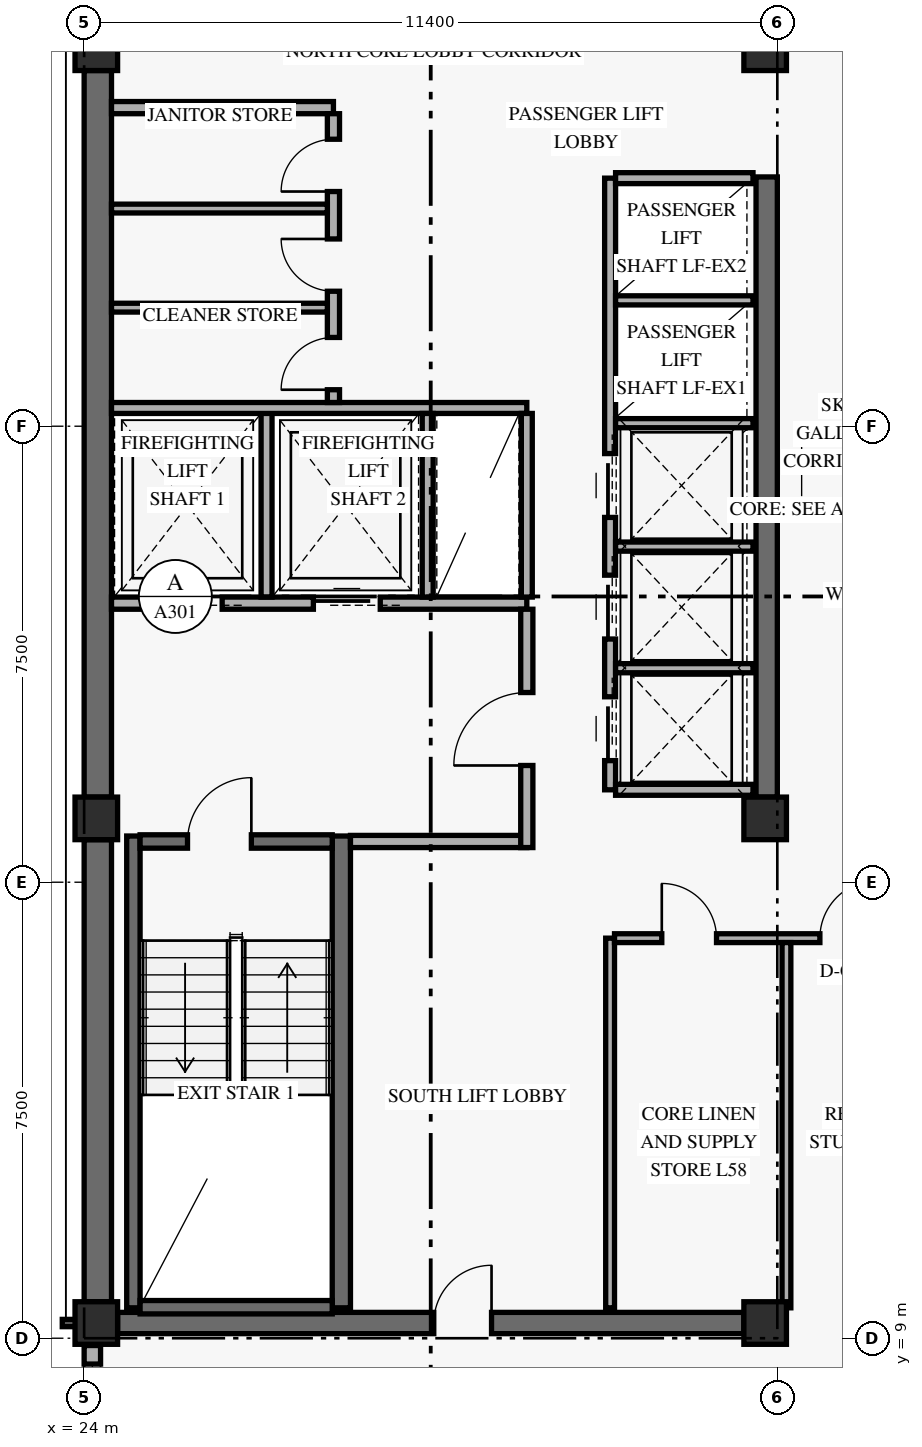
"""IFC4 building model, lengths in metres.
Left out: names, types, materials, properties, quantities, classifications, styles, units other than length and angle.
Written with IfcOpenShell. Run it as: python <this file> out.ifc"""

import sys

from ifc_helpers import new_model, si_unit, direction, frame, frame_2d, origin, origin_2d, place, context, subcontext, project, spatial, rectangle, extrude, element, fill, save


model = new_model("IFC4")
c1 = context("Model", 3, precision=1e-05, world=origin(), true_north=direction((0.0, 1.0)))
c2 = subcontext(c1, "Body", "Model", "MODEL_VIEW")
j1 = project(units=[si_unit("LENGTHUNIT", "METRE"), si_unit("PLANEANGLEUNIT", "RADIAN")], contexts=[c1])
p1 = place(None, origin())
s1 = spatial("IfcSite", under=j1, at=p1, CompositionType="ELEMENT")
p2 = place(p1, origin())
s2 = spatial("IfcBuilding", under=s1, at=p2, CompositionType="ELEMENT")
p3 = place(p2, frame((0.0, 0.0, 223.8)))
s3 = spatial("IfcBuildingStorey", under=s2, at=p3, CompositionType="ELEMENT", Elevation=223.8)
p4 = place(p3, frame((24.225, 9.6, 0.0), z_axis=(0.0, 0.0, 1.0), x_axis=(0.0, 1.0, 0.0)))
e1 = element("IfcWall", 1, at=p4, inside=s3, PredefinedType="SHEAR", context=c2, shape_type="SweptSolid", body=[
    extrude(rectangle(XDim=7.6, YDim=0.45, at=frame_2d((3.8, 0.0))), origin(), (0.0, 0.0, 1.0), 2.821),
])
p5 = place(p3, frame((24.225, 17.9, 0.0), z_axis=(0.0, 0.0, 1.0), x_axis=(0.0, 1.0, 0.0)))
e2 = element("IfcWall", 2, at=p5, inside=s3, PredefinedType="SHEAR", context=c2, shape_type="SweptSolid", body=[
    extrude(rectangle(XDim=11.95, YDim=0.45, at=frame_2d((5.975, 0.0))), origin(), (0.0, 0.0, 1.0), 2.821),
])
p6 = place(p3, frame((35.225, 17.9, 0.0), z_axis=(0.0, 0.0, 1.0), x_axis=(0.0, 1.0, 0.0)))
e3 = element("IfcWall", 3, at=p6, inside=s3, PredefinedType="SHEAR", context=c2, shape_type="SweptSolid", body=[
    extrude(rectangle(XDim=10.2, YDim=0.35, at=frame_2d((5.1, 0.0))), origin(), (0.0, 0.0, 1.0), 2.821),
])
p7 = place(p3, frame((24.55, 9.25, 0.0), z_axis=(0.0, 0.0, 1.0), x_axis=(1.0, 0.0, 0.0)))
e4 = element("IfcWall", 4, at=p7, inside=s3, PredefinedType="SHEAR", context=c2, shape_type="SweptSolid", body=[
    extrude(rectangle(XDim=10.3, YDim=0.35, at=frame_2d((5.15, 0.0))), origin(), (0.0, 0.0, 1.0), 3.36),
])
p8 = place(p7, frame((5.2, 0.0, 0.0)))
e5 = element("IfcOpeningElement", 5, at=p8, cuts=e4, PredefinedType="OPENING", context=c2, shape_type="SweptSolid", body=[
    extrude(rectangle(XDim=0.95, YDim=2.15, at=frame_2d((0.475, 1.075))), frame((0.0, 0.185, 0.0), z_axis=(0.0, -1.0, 0.0), x_axis=(1.0, 0.0, 0.0)), (0.0, 0.0, 1.0), 0.37),
])
p9 = place(p3, frame((24.81, 9.5, 0.0), z_axis=(0.0, 0.0, 1.0), x_axis=(0.0, 1.0, 0.0)))
e6 = element("IfcWall", 6, at=p9, inside=s3, PredefinedType="SHEAR", context=c2, shape_type="SweptSolid", body=[
    extrude(rectangle(XDim=7.76, YDim=0.22, at=frame_2d((3.88, 0.0))), origin(), (0.0, 0.0, 1.0), 3.36),
])
p10 = place(p3, frame((28.23, 9.5, 0.0), z_axis=(0.0, 0.0, 1.0), x_axis=(0.0, 1.0, 0.0)))
e7 = element("IfcWall", 7, at=p10, inside=s3, PredefinedType="SHEAR", context=c2, shape_type="SweptSolid", body=[
    extrude(rectangle(XDim=7.76, YDim=0.3, at=frame_2d((3.88, 0.0))), origin(), (0.0, 0.0, 1.0), 3.36),
])
p11 = place(p3, frame((24.92, 9.51, 0.0), z_axis=(0.0, 0.0, 1.0), x_axis=(1.0, 0.0, 0.0)))
e8 = element("IfcWall", 8, at=p11, inside=s3, PredefinedType="SHEAR", context=c2, shape_type="SweptSolid", body=[
    extrude(rectangle(XDim=3.16, YDim=0.22, at=frame_2d((1.58, 0.0))), origin(), (0.0, 0.0, 1.0), 3.36),
])
p12 = place(p3, frame((24.92, 17.17, 0.0), z_axis=(0.0, 0.0, 1.0), x_axis=(1.0, 0.0, 0.0)))
e9 = element("IfcWall", 9, at=p12, inside=s3, PredefinedType="SHEAR", context=c2, shape_type="SweptSolid", body=[
    extrude(rectangle(XDim=3.16, YDim=0.22, at=frame_2d((1.58, 0.0))), origin(), (0.0, 0.0, 1.0), 3.36),
])
p13 = place(p12, frame((0.78, 0.0, 0.0)))
e10 = element("IfcOpeningElement", 10, at=p13, cuts=e9, PredefinedType="OPENING", context=c2, shape_type="SweptSolid", body=[
    extrude(rectangle(XDim=1.05, YDim=2.15, at=frame_2d((0.525, 1.075))), frame((0.0, 0.12, 0.0), z_axis=(0.0, -1.0, 0.0), x_axis=(1.0, 0.0, 0.0)), (0.0, 0.0, 1.0), 0.24),
])
for number, where, z_axis, x_axis in (
    (11, (24.2, 9.25, 0.0), (0.0, 0.0, 1.0), (1.0, 0.0, 0.0)),
    (12, (24.2, 17.55, 0.0), (0.0, 0.0, 1.0), (1.0, 0.0, 0.0)),
    (13, (24.2, 30.2, 0.0), (0.0, 0.0, 1.0), (1.0, 0.0, 0.0)),
    (14, (35.2, 9.25, 0.0), (0.0, 0.0, 1.0), (1.0, 0.0, 0.0)),
    (15, (35.2, 17.55, 0.0), (0.0, 0.0, 1.0), (1.0, 0.0, 0.0)),
    (16, (35.2, 30.2, 0.0), (0.0, 0.0, 1.0), (1.0, 0.0, 0.0)),
):
    element("IfcColumn", number, at=place(p3, frame(where, z_axis=z_axis, x_axis=x_axis)), inside=s3, PredefinedType="COLUMN", context=c2, shape_type="SweptSolid", body=[
        extrude(rectangle(XDim=0.7, YDim=0.7, at=origin_2d()), origin(), (0.0, 0.0, 1.0), 3.6),
    ])
p14 = place(p3, frame((24.135, 7.32, 0.0), z_axis=(0.0, 0.0, 1.0), x_axis=(0.0, 1.0, 0.0)))
e17 = element("IfcWall", 17, at=p14, inside=s3, PredefinedType="SOLIDWALL", context=c2, shape_type="SweptSolid", body=[
    extrude(rectangle(XDim=1.56, YDim=0.27, at=frame_2d((0.78, 0.0))), origin(), (0.0, 0.0, 1.0), 2.803),
])
p15 = place(p14, frame((0.305, 0.0, 0.85)))
e18 = element("IfcOpeningElement", 18, at=p15, cuts=e17, PredefinedType="OPENING", context=c2, shape_type="SweptSolid", body=[
    extrude(rectangle(XDim=0.95, YDim=1.5, at=frame_2d((0.475, 0.75))), frame((0.0, 0.145, 0.0), z_axis=(0.0, -1.0, 0.0), x_axis=(1.0, 0.0, 0.0)), (0.0, 0.0, 1.0), 0.29),
])
p16 = place(p3, frame((24.45, 21.09, 0.0), z_axis=(0.0, 0.0, 1.0), x_axis=(1.0, 0.0, 0.0)))
e19 = element("IfcWall", 19, at=p16, inside=s3, PredefinedType="STANDARD", context=c2, shape_type="SweptSolid", body=[
    extrude(rectangle(XDim=6.83, YDim=0.2, at=frame_2d((3.415, 0.0))), origin(), (0.0, 0.0, 1.0), 3.36),
])
p17 = place(p16, frame((0.72, 0.0, 0.0)))
e20 = element("IfcOpeningElement", 20, at=p17, cuts=e19, PredefinedType="OPENING", context=c2, shape_type="SweptSolid", body=[
    extrude(rectangle(XDim=1.1, YDim=2.2, at=frame_2d((0.55, 1.1))), frame((0.0, 0.11, 0.0), z_axis=(0.0, -1.0, 0.0), x_axis=(1.0, 0.0, 0.0)), (0.0, 0.0, 1.0), 0.22),
])
p18 = place(p16, frame((3.32, 0.0, 0.0)))
e21 = element("IfcOpeningElement", 21, at=p18, cuts=e19, PredefinedType="OPENING", context=c2, shape_type="SweptSolid", body=[
    extrude(rectangle(XDim=1.1, YDim=2.2, at=frame_2d((0.55, 1.1))), frame((0.0, 0.11, 0.0), z_axis=(0.0, -1.0, 0.0), x_axis=(1.0, 0.0, 0.0)), (0.0, 0.0, 1.0), 0.22),
])
p19 = place(p3, frame((28.38, 17.17, 0.0), z_axis=(0.0, 0.0, 1.0), x_axis=(1.0, 0.0, 0.0)))
e22 = element("IfcWall", 22, at=p19, inside=s3, PredefinedType="STANDARD", context=c2, shape_type="SweptSolid", body=[
    extrude(rectangle(XDim=2.9, YDim=0.2, at=frame_2d((1.45, 0.0))), origin(), (0.0, 0.0, 1.0), 3.36),
])
p20 = place(p3, frame((31.28, 17.07, 0.0), z_axis=(0.0, 0.0, 1.0), x_axis=(0.0, 1.0, 0.0)))
e23 = element("IfcWall", 23, at=p20, inside=s3, PredefinedType="STANDARD", context=c2, shape_type="SweptSolid", body=[
    extrude(rectangle(XDim=3.92, YDim=0.2, at=frame_2d((1.96, 0.0))), origin(), (0.0, 0.0, 1.0), 2.803),
])
p21 = place(p20, frame((1.35, 0.0, 0.0)))
e24 = element("IfcOpeningElement", 24, at=p21, cuts=e23, PredefinedType="OPENING", context=c2, shape_type="SweptSolid", body=[
    extrude(rectangle(XDim=1.2, YDim=2.15, at=frame_2d((0.6, 1.075))), frame((0.0, 0.11, 0.0), z_axis=(0.0, -1.0, 0.0), x_axis=(1.0, 0.0, 0.0)), (0.0, 0.0, 1.0), 0.22),
])
p22 = place(p3, frame((27.0, 21.19, 0.0), z_axis=(0.0, 0.0, 1.0), x_axis=(0.0, 1.0, 0.0)))
e25 = element("IfcWall", 25, at=p22, inside=s3, PredefinedType="STANDARD", context=c2, shape_type="SweptSolid", body=[
    extrude(rectangle(XDim=3.11, YDim=0.18, at=frame_2d((1.555, 0.0))), origin(), (0.0, 0.0, 1.0), 3.36),
])
p23 = place(p3, frame((24.45, 24.3, 0.0), z_axis=(0.0, 0.0, 1.0), x_axis=(1.0, 0.0, 0.0)))
e26 = element("IfcWall", 26, at=p23, inside=s3, PredefinedType="STANDARD", context=c2, shape_type="SweptSolid", body=[
    extrude(rectangle(XDim=6.83, YDim=0.18, at=frame_2d((3.415, 0.0))), origin(), (0.0, 0.0, 1.0), 3.36),
])
for number, where, z_axis, x_axis in (
    (27, (29.65, 21.19, 0.0), (0.0, 0.0, 1.0), (0.0, 1.0, 0.0)),
    (28, (31.28, 21.19, 0.0), (0.0, 0.0, 1.0), (0.0, 1.0, 0.0)),
):
    element("IfcWall", number, at=place(p3, frame(where, z_axis=z_axis, x_axis=x_axis)), inside=s3, PredefinedType="STANDARD", context=c2, shape_type="SweptSolid", body=[
        extrude(rectangle(XDim=3.02, YDim=0.18, at=frame_2d((1.51, 0.0))), origin(), (0.0, 0.0, 1.0), 3.36),
    ])
p24 = place(p3, frame((24.45, 29.24, 0.0), z_axis=(0.0, 0.0, 1.0), x_axis=(1.0, 0.0, 0.0)))
e29 = element("IfcWall", 29, at=p24, inside=s3, PredefinedType="STANDARD", context=c2, shape_type="SweptSolid", body=[
    extrude(rectangle(XDim=3.65, YDim=0.2, at=frame_2d((1.825, 0.0))), origin(), (0.0, 0.0, 1.0), 3.36),
])
p25 = place(p3, frame((28.1, 24.39, 0.0), z_axis=(0.0, 0.0, 1.0), x_axis=(0.0, 1.0, 0.0)))
e30 = element("IfcWall", 30, at=p25, inside=s3, PredefinedType="STANDARD", context=c2, shape_type="SweptSolid", body=[
    extrude(rectangle(XDim=4.75, YDim=0.2, at=frame_2d((2.375, 0.0))), origin(), (0.0, 0.0, 1.0), 3.36),
])
p26 = place(p25, frame((0.21, 0.0, 0.0)))
e31 = element("IfcOpeningElement", 31, at=p26, cuts=e30, PredefinedType="OPENING", context=c2, shape_type="SweptSolid", body=[
    extrude(rectangle(XDim=0.86, YDim=2.1, at=frame_2d((0.43, 1.05))), frame((0.0, 0.11, 0.0), z_axis=(0.0, -1.0, 0.0), x_axis=(1.0, 0.0, 0.0)), (0.0, 0.0, 1.0), 0.22),
])
p27 = place(p25, frame((1.83, 0.0, 0.0)))
e32 = element("IfcOpeningElement", 32, at=p27, cuts=e30, PredefinedType="OPENING", context=c2, shape_type="SweptSolid", body=[
    extrude(rectangle(XDim=0.86, YDim=2.1, at=frame_2d((0.43, 1.05))), frame((0.0, 0.11, 0.0), z_axis=(0.0, -1.0, 0.0), x_axis=(1.0, 0.0, 0.0)), (0.0, 0.0, 1.0), 0.22),
])
p28 = place(p25, frame((3.47, 0.0, 0.0)))
e33 = element("IfcOpeningElement", 33, at=p28, cuts=e30, PredefinedType="OPENING", context=c2, shape_type="SweptSolid", body=[
    extrude(rectangle(XDim=0.86, YDim=2.1, at=frame_2d((0.43, 1.05))), frame((0.0, 0.11, 0.0), z_axis=(0.0, -1.0, 0.0), x_axis=(1.0, 0.0, 0.0)), (0.0, 0.0, 1.0), 0.22),
])
for number, where, z_axis, x_axis in (
    (34, (24.45, 25.95, 0.0), (0.0, 0.0, 1.0), (1.0, 0.0, 0.0)),
    (35, (24.45, 27.58, 0.0), (0.0, 0.0, 1.0), (1.0, 0.0, 0.0)),
):
    element("IfcWall", number, at=place(p3, frame(where, z_axis=z_axis, x_axis=x_axis)), inside=s3, PredefinedType="PARTITIONING", context=c2, shape_type="SweptSolid", body=[
        extrude(rectangle(XDim=3.55, YDim=0.145, at=frame_2d((1.775, 0.0))), origin(), (0.0, 0.0, 1.0), 3.36),
    ])
p29 = place(p3, frame((32.65, 18.02, 0.0), z_axis=(0.0, 0.0, 1.0), x_axis=(0.0, 1.0, 0.0)))
e36 = element("IfcWall", 36, at=p29, inside=s3, PredefinedType="STANDARD", context=c2, shape_type="SweptSolid", body=[
    extrude(rectangle(XDim=10.06, YDim=0.18, at=frame_2d((5.03, 0.0))), origin(), (0.0, 0.0, 1.0), 3.36),
])
p30 = place(p29, frame((0.48, 0.0, 0.0)))
e37 = element("IfcOpeningElement", 37, at=p30, cuts=e36, PredefinedType="OPENING", context=c2, shape_type="SweptSolid", body=[
    extrude(rectangle(XDim=1.05, YDim=2.2, at=frame_2d((0.525, 1.1))), frame((0.0, 0.1, 0.0), z_axis=(0.0, -1.0, 0.0), x_axis=(1.0, 0.0, 0.0)), (0.0, 0.0, 1.0), 0.2),
])
p31 = place(p29, frame((2.48, 0.0, 0.0)))
e38 = element("IfcOpeningElement", 38, at=p31, cuts=e36, PredefinedType="OPENING", context=c2, shape_type="SweptSolid", body=[
    extrude(rectangle(XDim=1.05, YDim=2.2, at=frame_2d((0.525, 1.1))), frame((0.0, 0.1, 0.0), z_axis=(0.0, -1.0, 0.0), x_axis=(1.0, 0.0, 0.0)), (0.0, 0.0, 1.0), 0.2),
])
p32 = place(p29, frame((4.48, 0.0, 0.0)))
e39 = element("IfcOpeningElement", 39, at=p32, cuts=e36, PredefinedType="OPENING", context=c2, shape_type="SweptSolid", body=[
    extrude(rectangle(XDim=1.05, YDim=2.2, at=frame_2d((0.525, 1.1))), frame((0.0, 0.1, 0.0), z_axis=(0.0, -1.0, 0.0), x_axis=(1.0, 0.0, 0.0)), (0.0, 0.0, 1.0), 0.2),
])
for number, where, z_axis, x_axis in (
    (40, (32.74, 18.02, 0.0), (0.0, 0.0, 1.0), (1.0, 0.0, 0.0)),
    (41, (32.74, 28.08, 0.0), (0.0, 0.0, 1.0), (1.0, 0.0, 0.0)),
):
    element("IfcWall", number, at=place(p3, frame(where, z_axis=z_axis, x_axis=x_axis)), inside=s3, PredefinedType="STANDARD", context=c2, shape_type="SweptSolid", body=[
        extrude(rectangle(XDim=2.26, YDim=0.18, at=frame_2d((1.13, 0.0))), origin(), (0.0, 0.0, 1.0), 3.36),
    ])
for number, where, z_axis, x_axis in (
    (42, (32.74, 20.02, 0.0), (0.0, 0.0, 1.0), (1.0, 0.0, 0.0)),
    (43, (32.74, 22.02, 0.0), (0.0, 0.0, 1.0), (1.0, 0.0, 0.0)),
    (44, (32.74, 24.05, 0.0), (0.0, 0.0, 1.0), (1.0, 0.0, 0.0)),
    (45, (32.74, 26.07, 0.0), (0.0, 0.0, 1.0), (1.0, 0.0, 0.0)),
):
    element("IfcWall", number, at=place(p3, frame(where, z_axis=z_axis, x_axis=x_axis)), inside=s3, PredefinedType="STANDARD", context=c2, shape_type="SweptSolid", body=[
        extrude(rectangle(XDim=2.26, YDim=0.15, at=frame_2d((1.13, 0.0))), origin(), (0.0, 0.0, 1.0), 3.36),
    ])
p33 = place(p3, frame((32.65, 9.5, 0.0), z_axis=(0.0, 0.0, 1.0), x_axis=(0.0, 1.0, 0.0)))
e46 = element("IfcWall", 46, at=p33, inside=s3, PredefinedType="PARTITIONING", context=c2, shape_type="SweptSolid", body=[
    extrude(rectangle(XDim=6.08, YDim=0.145, at=frame_2d((3.04, 0.0))), origin(), (0.0, 0.0, 1.0), 3.36),
])
p34 = place(p3, frame((32.722, 15.58, 0.0), z_axis=(0.0, 0.0, 1.0), x_axis=(1.0, 0.0, 0.0)))
e47 = element("IfcWall", 47, at=p34, inside=s3, PredefinedType="PARTITIONING", context=c2, shape_type="SweptSolid", body=[
    extrude(rectangle(XDim=5.628, YDim=0.145, at=frame_2d((2.814, 0.0))), origin(), (0.0, 0.0, 1.0), 2.803),
])
p35 = place(p34, frame((0.778, 0.0, 0.0)))
e48 = element("IfcOpeningElement", 48, at=p35, cuts=e47, PredefinedType="OPENING", context=c2, shape_type="SweptSolid", body=[
    extrude(rectangle(XDim=0.9, YDim=2.1, at=frame_2d((0.45, 1.05))), frame((0.0, 0.083, 0.0), z_axis=(0.0, -1.0, 0.0), x_axis=(1.0, 0.0, 0.0)), (0.0, 0.0, 1.0), 0.165),
])
p36 = place(p34, frame((3.377, 0.0, 0.0)))
e49 = element("IfcOpeningElement", 49, at=p36, cuts=e47, PredefinedType="OPENING", context=c2, shape_type="SweptSolid", body=[
    extrude(rectangle(XDim=0.95, YDim=2.15, at=frame_2d((0.475, 1.075))), frame((0.0, 0.083, 0.0), z_axis=(0.0, -1.0, 0.0), x_axis=(1.0, 0.0, 0.0)), (0.0, 0.0, 1.0), 0.165),
])
p37 = place(p3, frame((35.55, 9.5, 0.0), z_axis=(0.0, 0.0, 1.0), x_axis=(0.0, 1.0, 0.0)))
e50 = element("IfcWall", 50, at=p37, inside=s3, PredefinedType="PARTITIONING", context=c2, shape_type="SweptSolid", body=[
    extrude(rectangle(XDim=6.008, YDim=0.145, at=frame_2d((3.004, 0.0))), origin(), (0.0, 0.0, 1.0), 3.039),
])
p38 = place(p15, origin())
e51 = element("IfcWindow", 51, at=p38, inside=s3, PartitioningType="SINGLE_PANEL", PredefinedType="WINDOW", context=c2, shape_type="SweptSolid", body=[
    extrude(rectangle(XDim=0.95, YDim=1.5, at=frame_2d((0.475, 0.75))), frame((0.0, 0.03, 0.0), z_axis=(0.0, -1.0, 0.0), x_axis=(1.0, 0.0, 0.0)), (0.0, 0.0, 1.0), 0.06),
])
fill(e18, e51)
p39 = place(p13, frame((1.05, 0.0, 0.0), z_axis=(0.0, 0.0, 1.0), x_axis=(-1.0, 0.0, 0.0)))
e52 = element("IfcDoor", 52, at=p39, inside=s3, OperationType="SINGLE_SWING_LEFT", PredefinedType="DOOR", context=c2, shape_type="SweptSolid", body=[
    extrude(rectangle(XDim=1.05, YDim=2.15, at=frame_2d((0.525, 1.075))), frame((0.0, 0.025, 0.0), z_axis=(0.0, -1.0, 0.0), x_axis=(1.0, 0.0, 0.0)), (0.0, 0.0, 1.0), 0.05),
])
fill(e10, e52)
p40 = place(p17, origin())
e53 = element("IfcDoor", 53, at=p40, inside=s3, OperationType="SLIDING_TO_LEFT", PredefinedType="DOOR", context=c2, shape_type="SweptSolid", body=[
    extrude(rectangle(XDim=1.1, YDim=2.2, at=frame_2d((0.55, 1.1))), frame((0.0, 0.025, 0.0), z_axis=(0.0, -1.0, 0.0), x_axis=(1.0, 0.0, 0.0)), (0.0, 0.0, 1.0), 0.05),
])
fill(e20, e53)
p41 = place(p18, origin())
e54 = element("IfcDoor", 54, at=p41, inside=s3, OperationType="SLIDING_TO_LEFT", PredefinedType="DOOR", context=c2, shape_type="SweptSolid", body=[
    extrude(rectangle(XDim=1.1, YDim=2.2, at=frame_2d((0.55, 1.1))), frame((0.0, 0.025, 0.0), z_axis=(0.0, -1.0, 0.0), x_axis=(1.0, 0.0, 0.0)), (0.0, 0.0, 1.0), 0.05),
])
fill(e21, e54)
p42 = place(p21, origin())
e55 = element("IfcDoor", 55, at=p42, inside=s3, OperationType="SINGLE_SWING_LEFT", PredefinedType="DOOR", context=c2, shape_type="SweptSolid", body=[
    extrude(rectangle(XDim=1.2, YDim=2.15, at=frame_2d((0.6, 1.075))), frame((0.0, 0.025, 0.0), z_axis=(0.0, -1.0, 0.0), x_axis=(1.0, 0.0, 0.0)), (0.0, 0.0, 1.0), 0.05),
])
fill(e24, e55)
p43 = place(p26, origin())
e56 = element("IfcDoor", 56, at=p43, inside=s3, OperationType="SINGLE_SWING_LEFT", PredefinedType="DOOR", context=c2, shape_type="SweptSolid", body=[
    extrude(rectangle(XDim=0.86, YDim=2.1, at=frame_2d((0.43, 1.05))), frame((0.0, 0.025, 0.0), z_axis=(0.0, -1.0, 0.0), x_axis=(1.0, 0.0, 0.0)), (0.0, 0.0, 1.0), 0.05),
])
fill(e31, e56)
p44 = place(p27, origin())
e57 = element("IfcDoor", 57, at=p44, inside=s3, OperationType="SINGLE_SWING_RIGHT", PredefinedType="DOOR", context=c2, shape_type="SweptSolid", body=[
    extrude(rectangle(XDim=0.86, YDim=2.1, at=frame_2d((0.43, 1.05))), frame((0.0, 0.025, 0.0), z_axis=(0.0, -1.0, 0.0), x_axis=(1.0, 0.0, 0.0)), (0.0, 0.0, 1.0), 0.05),
])
fill(e32, e57)
p45 = place(p28, origin())
e58 = element("IfcDoor", 58, at=p45, inside=s3, OperationType="SINGLE_SWING_LEFT", PredefinedType="DOOR", context=c2, shape_type="SweptSolid", body=[
    extrude(rectangle(XDim=0.86, YDim=2.1, at=frame_2d((0.43, 1.05))), frame((0.0, 0.025, 0.0), z_axis=(0.0, -1.0, 0.0), x_axis=(1.0, 0.0, 0.0)), (0.0, 0.0, 1.0), 0.05),
])
fill(e33, e58)
p46 = place(p30, origin())
e59 = element("IfcDoor", 59, at=p46, inside=s3, OperationType="SLIDING_TO_LEFT", PredefinedType="DOOR", context=c2, shape_type="SweptSolid", body=[
    extrude(rectangle(XDim=1.05, YDim=2.2, at=frame_2d((0.525, 1.1))), frame((0.0, 0.025, 0.0), z_axis=(0.0, -1.0, 0.0), x_axis=(1.0, 0.0, 0.0)), (0.0, 0.0, 1.0), 0.05),
])
fill(e37, e59)
p47 = place(p31, origin())
e60 = element("IfcDoor", 60, at=p47, inside=s3, OperationType="SLIDING_TO_LEFT", PredefinedType="DOOR", context=c2, shape_type="SweptSolid", body=[
    extrude(rectangle(XDim=1.05, YDim=2.2, at=frame_2d((0.525, 1.1))), frame((0.0, 0.025, 0.0), z_axis=(0.0, -1.0, 0.0), x_axis=(1.0, 0.0, 0.0)), (0.0, 0.0, 1.0), 0.05),
])
fill(e38, e60)
p48 = place(p32, origin())
e61 = element("IfcDoor", 61, at=p48, inside=s3, OperationType="SLIDING_TO_LEFT", PredefinedType="DOOR", context=c2, shape_type="SweptSolid", body=[
    extrude(rectangle(XDim=1.05, YDim=2.2, at=frame_2d((0.525, 1.1))), frame((0.0, 0.025, 0.0), z_axis=(0.0, -1.0, 0.0), x_axis=(1.0, 0.0, 0.0)), (0.0, 0.0, 1.0), 0.05),
])
fill(e39, e61)
p49 = place(p35, origin())
e62 = element("IfcDoor", 62, at=p49, inside=s3, OperationType="SINGLE_SWING_LEFT", PredefinedType="DOOR", context=c2, shape_type="SweptSolid", body=[
    extrude(rectangle(XDim=0.9, YDim=2.1, at=frame_2d((0.45, 1.05))), frame((0.0, 0.025, 0.0), z_axis=(0.0, -1.0, 0.0), x_axis=(1.0, 0.0, 0.0)), (0.0, 0.0, 1.0), 0.05),
])
fill(e48, e62)
p50 = place(p36, origin())
e63 = element("IfcDoor", 63, at=p50, inside=s3, OperationType="SINGLE_SWING_RIGHT", PredefinedType="DOOR", context=c2, shape_type="SweptSolid", body=[
    extrude(rectangle(XDim=0.95, YDim=2.15, at=frame_2d((0.475, 1.075))), frame((0.0, 0.025, 0.0), z_axis=(0.0, -1.0, 0.0), x_axis=(1.0, 0.0, 0.0)), (0.0, 0.0, 1.0), 0.05),
])
fill(e49, e63)
p51 = place(p8, frame((0.95, 0.0, 0.0), z_axis=(0.0, 0.0, 1.0), x_axis=(-1.0, 0.0, 0.0)))
e64 = element("IfcDoor", 64, at=p51, inside=s3, OperationType="SINGLE_SWING_LEFT", PredefinedType="DOOR", context=c2, shape_type="SweptSolid", body=[
    extrude(rectangle(XDim=0.95, YDim=2.15, at=frame_2d((0.475, 1.075))), frame((0.0, 0.025, 0.0), z_axis=(0.0, -1.0, 0.0), x_axis=(1.0, 0.0, 0.0)), (0.0, 0.0, 1.0), 0.05),
])
fill(e5, e64)
save(model, sys.argv[1])
